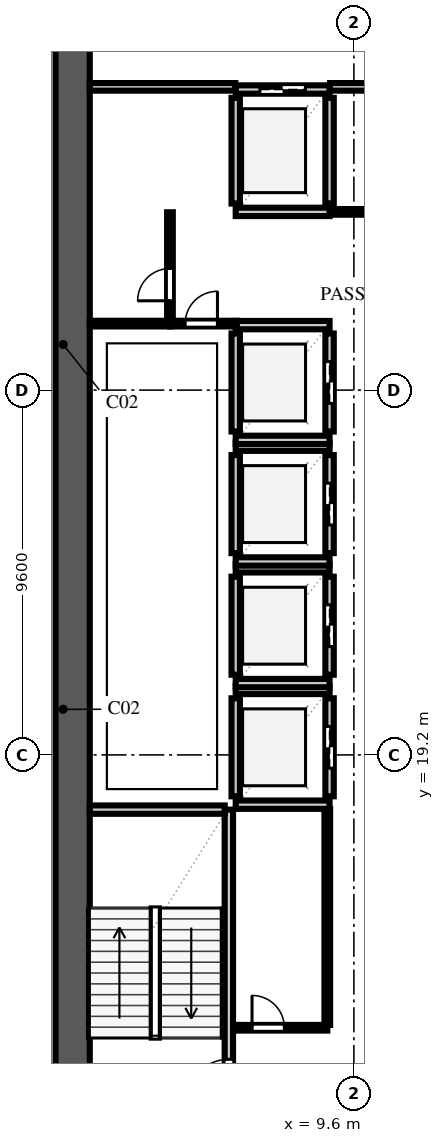
"""IFC4 building model, lengths in metres.
Left out: names, types, materials, properties, quantities, classifications, styles, units other than length and angle.
Written with IfcOpenShell. Run it as: python <this file> out.ifc"""

import sys

from ifc_helpers import new_model, si_unit, direction, frame, frame_2d, origin, place, context, subcontext, project, spatial, rectangle, extrude, element, fill, save


model = new_model("IFC4")
c1 = context("Model", 3, precision=1e-05, world=origin(), true_north=direction((0.0, 1.0)))
c2 = subcontext(c1, "Body", "Model", "MODEL_VIEW")
j1 = project(units=[si_unit("LENGTHUNIT", "METRE"), si_unit("PLANEANGLEUNIT", "RADIAN")], contexts=[c1])
p1 = place(None, origin())
s1 = spatial("IfcSite", under=j1, at=p1, CompositionType="ELEMENT")
p2 = place(p1, origin())
s2 = spatial("IfcBuilding", under=s1, at=p2, CompositionType="ELEMENT")
p3 = place(p2, frame((0.0, 0.0, 10.4)))
s3 = spatial("IfcBuildingStorey", under=s2, at=p3, CompositionType="ELEMENT", Elevation=10.4)
p4 = place(p3, frame((2.2, 9.15, 0.0), z_axis=(0.0, 0.0, 1.0), x_axis=(0.0, 1.0, 0.0)))
e1 = element("IfcWall", 1, at=p4, inside=s3, PredefinedType="SHEAR", context=c2, shape_type="SweptSolid", body=[
    extrude(rectangle(XDim=39.3, YDim=0.9, at=frame_2d((19.65, 0.0))), origin(), (0.0, 0.0, 1.0), 4.26),
])
p5 = place(p3, frame((6.31, 9.95, 0.0), z_axis=(0.0, 0.0, 1.0), x_axis=(0.0, 1.0, 0.0)))
e2 = element("IfcWall", 2, at=p5, inside=s3, PredefinedType="SOLIDWALL", context=c2, shape_type="SweptSolid", body=[
    extrude(rectangle(XDim=7.81, YDim=0.22, at=frame_2d((3.905, 0.0))), origin(), (0.0, 0.0, 1.0), 4.26),
])
p6 = place(p5, frame((0.14, 0.0, 0.0)))
e3 = element("IfcOpeningElement", 3, at=p6, cuts=e2, PredefinedType="OPENING", context=c2, shape_type="SweptSolid", body=[
    extrude(rectangle(XDim=1.1, YDim=2.2, at=frame_2d((0.55, 1.1))), frame((0.0, 0.122, 0.0), z_axis=(0.0, -1.0, 0.0), x_axis=(1.0, 0.0, 0.0)), (0.0, 0.0, 1.0), 0.244),
])
p7 = place(p3, frame((2.65, 17.76, 0.0), z_axis=(0.0, 0.0, 1.0), x_axis=(1.0, 0.0, 0.0)))
e4 = element("IfcWall", 4, at=p7, inside=s3, PredefinedType="SOLIDWALL", context=c2, shape_type="SweptSolid", body=[
    extrude(rectangle(XDim=3.55, YDim=0.22, at=frame_2d((1.775, 0.0))), origin(), (0.0, 0.0, 1.0), 4.26),
])
p8 = place(p3, frame((6.49, 18.11, 0.0), z_axis=(0.0, 0.0, 1.0), x_axis=(0.0, 1.0, 0.0)))
e5 = element("IfcWall", 5, at=p8, inside=s3, PredefinedType="SOLIDWALL", context=c2, shape_type="SweptSolid", body=[
    extrude(rectangle(XDim=2.58, YDim=0.22, at=frame_2d((1.29, 0.0))), origin(), (0.0, 0.0, 1.0), 4.26),
])
p9 = place(p3, frame((8.96, 18.11, 0.0), z_axis=(0.0, 0.0, 1.0), x_axis=(0.0, 1.0, 0.0)))
e6 = element("IfcWall", 6, at=p9, inside=s3, PredefinedType="SOLIDWALL", context=c2, shape_type="SweptSolid", body=[
    extrude(rectangle(XDim=2.58, YDim=0.22, at=frame_2d((1.29, 0.0))), origin(), (0.0, 0.0, 1.0), 4.26),
])
p10 = place(p9, frame((0.74, 0.0, 0.0)))
e7 = element("IfcOpeningElement", 7, at=p10, cuts=e6, PredefinedType="OPENING", context=c2, shape_type="SweptSolid", body=[
    extrude(rectangle(XDim=1.1, YDim=2.2, at=frame_2d((0.55, 1.1))), frame((0.0, 0.122, 0.0), z_axis=(0.0, -1.0, 0.0), x_axis=(1.0, 0.0, 0.0)), (0.0, 0.0, 1.0), 0.244),
])
for number, where, z_axis, x_axis in (
    (8, (6.49, 17.89, 0.0), (0.0, 0.0, 1.0), (1.0, 0.0, 0.0)),
    (9, (6.49, 20.91, 0.0), (0.0, 0.0, 1.0), (1.0, 0.0, 0.0)),
):
    element("IfcWall", number, at=place(p3, frame(where, z_axis=z_axis, x_axis=x_axis)), inside=s3, PredefinedType="SOLIDWALL", context=c2, shape_type="SweptSolid", body=[
        extrude(rectangle(XDim=2.47, YDim=0.22, at=frame_2d((1.235, 0.0))), origin(), (0.0, 0.0, 1.0), 4.26),
    ])
p11 = place(p3, frame((6.49, 21.31, 0.0), z_axis=(0.0, 0.0, 1.0), x_axis=(0.0, 1.0, 0.0)))
e10 = element("IfcWall", 10, at=p11, inside=s3, PredefinedType="SOLIDWALL", context=c2, shape_type="SweptSolid", body=[
    extrude(rectangle(XDim=2.58, YDim=0.22, at=frame_2d((1.29, 0.0))), origin(), (0.0, 0.0, 1.0), 4.26),
])
p12 = place(p3, frame((8.96, 21.31, 0.0), z_axis=(0.0, 0.0, 1.0), x_axis=(0.0, 1.0, 0.0)))
e11 = element("IfcWall", 11, at=p12, inside=s3, PredefinedType="SOLIDWALL", context=c2, shape_type="SweptSolid", body=[
    extrude(rectangle(XDim=2.58, YDim=0.22, at=frame_2d((1.29, 0.0))), origin(), (0.0, 0.0, 1.0), 4.26),
])
p13 = place(p12, frame((0.74, 0.0, 0.0)))
e12 = element("IfcOpeningElement", 12, at=p13, cuts=e11, PredefinedType="OPENING", context=c2, shape_type="SweptSolid", body=[
    extrude(rectangle(XDim=1.1, YDim=2.2, at=frame_2d((0.55, 1.1))), frame((0.0, 0.122, 0.0), z_axis=(0.0, -1.0, 0.0), x_axis=(1.0, 0.0, 0.0)), (0.0, 0.0, 1.0), 0.244),
])
for number, where, z_axis, x_axis in (
    (13, (6.49, 21.09, 0.0), (0.0, 0.0, 1.0), (1.0, 0.0, 0.0)),
    (14, (6.49, 24.11, 0.0), (0.0, 0.0, 1.0), (1.0, 0.0, 0.0)),
):
    element("IfcWall", number, at=place(p3, frame(where, z_axis=z_axis, x_axis=x_axis)), inside=s3, PredefinedType="SOLIDWALL", context=c2, shape_type="SweptSolid", body=[
        extrude(rectangle(XDim=2.47, YDim=0.22, at=frame_2d((1.235, 0.0))), origin(), (0.0, 0.0, 1.0), 4.26),
    ])
p14 = place(p3, frame((6.49, 24.51, 0.0), z_axis=(0.0, 0.0, 1.0), x_axis=(0.0, 1.0, 0.0)))
e15 = element("IfcWall", 15, at=p14, inside=s3, PredefinedType="SOLIDWALL", context=c2, shape_type="SweptSolid", body=[
    extrude(rectangle(XDim=2.58, YDim=0.22, at=frame_2d((1.29, 0.0))), origin(), (0.0, 0.0, 1.0), 4.26),
])
p15 = place(p3, frame((8.96, 24.51, 0.0), z_axis=(0.0, 0.0, 1.0), x_axis=(0.0, 1.0, 0.0)))
e16 = element("IfcWall", 16, at=p15, inside=s3, PredefinedType="SOLIDWALL", context=c2, shape_type="SweptSolid", body=[
    extrude(rectangle(XDim=2.58, YDim=0.22, at=frame_2d((1.29, 0.0))), origin(), (0.0, 0.0, 1.0), 4.26),
])
p16 = place(p15, frame((0.74, 0.0, 0.0)))
e17 = element("IfcOpeningElement", 17, at=p16, cuts=e16, PredefinedType="OPENING", context=c2, shape_type="SweptSolid", body=[
    extrude(rectangle(XDim=1.1, YDim=2.2, at=frame_2d((0.55, 1.1))), frame((0.0, 0.122, 0.0), z_axis=(0.0, -1.0, 0.0), x_axis=(1.0, 0.0, 0.0)), (0.0, 0.0, 1.0), 0.244),
])
for number, where, z_axis, x_axis in (
    (18, (6.49, 24.29, 0.0), (0.0, 0.0, 1.0), (1.0, 0.0, 0.0)),
    (19, (6.49, 27.31, 0.0), (0.0, 0.0, 1.0), (1.0, 0.0, 0.0)),
):
    element("IfcWall", number, at=place(p3, frame(where, z_axis=z_axis, x_axis=x_axis)), inside=s3, PredefinedType="SOLIDWALL", context=c2, shape_type="SweptSolid", body=[
        extrude(rectangle(XDim=2.47, YDim=0.22, at=frame_2d((1.235, 0.0))), origin(), (0.0, 0.0, 1.0), 4.26),
    ])
p17 = place(p3, frame((6.49, 27.71, 0.0), z_axis=(0.0, 0.0, 1.0), x_axis=(0.0, 1.0, 0.0)))
e20 = element("IfcWall", 20, at=p17, inside=s3, PredefinedType="SOLIDWALL", context=c2, shape_type="SweptSolid", body=[
    extrude(rectangle(XDim=2.58, YDim=0.22, at=frame_2d((1.29, 0.0))), origin(), (0.0, 0.0, 1.0), 4.26),
])
p18 = place(p3, frame((8.96, 27.71, 0.0), z_axis=(0.0, 0.0, 1.0), x_axis=(0.0, 1.0, 0.0)))
e21 = element("IfcWall", 21, at=p18, inside=s3, PredefinedType="SOLIDWALL", context=c2, shape_type="SweptSolid", body=[
    extrude(rectangle(XDim=2.58, YDim=0.22, at=frame_2d((1.29, 0.0))), origin(), (0.0, 0.0, 1.0), 4.26),
])
p19 = place(p18, frame((0.74, 0.0, 0.0)))
e22 = element("IfcOpeningElement", 22, at=p19, cuts=e21, PredefinedType="OPENING", context=c2, shape_type="SweptSolid", body=[
    extrude(rectangle(XDim=1.1, YDim=2.2, at=frame_2d((0.55, 1.1))), frame((0.0, 0.122, 0.0), z_axis=(0.0, -1.0, 0.0), x_axis=(1.0, 0.0, 0.0)), (0.0, 0.0, 1.0), 0.244),
])
for number, where, z_axis, x_axis in (
    (23, (6.49, 27.49, 0.0), (0.0, 0.0, 1.0), (1.0, 0.0, 0.0)),
    (24, (6.49, 30.51, 0.0), (0.0, 0.0, 1.0), (1.0, 0.0, 0.0)),
):
    element("IfcWall", number, at=place(p3, frame(where, z_axis=z_axis, x_axis=x_axis)), inside=s3, PredefinedType="SOLIDWALL", context=c2, shape_type="SweptSolid", body=[
        extrude(rectangle(XDim=2.47, YDim=0.22, at=frame_2d((1.235, 0.0))), origin(), (0.0, 0.0, 1.0), 4.26),
    ])
for number, where, z_axis, x_axis in (
    (25, (6.49, 33.71, 0.0), (0.0, 0.0, 1.0), (0.0, 1.0, 0.0)),
    (26, (8.96, 33.71, 0.0), (0.0, 0.0, 1.0), (0.0, 1.0, 0.0)),
):
    element("IfcWall", number, at=place(p3, frame(where, z_axis=z_axis, x_axis=x_axis)), inside=s3, PredefinedType="SOLIDWALL", context=c2, shape_type="SweptSolid", body=[
        extrude(rectangle(XDim=2.78, YDim=0.22, at=frame_2d((1.39, 0.0))), origin(), (0.0, 0.0, 1.0), 4.26),
    ])
p20 = place(p3, frame((6.49, 33.49, 0.0), z_axis=(0.0, 0.0, 1.0), x_axis=(1.0, 0.0, 0.0)))
e27 = element("IfcWall", 27, at=p20, inside=s3, PredefinedType="SOLIDWALL", context=c2, shape_type="SweptSolid", body=[
    extrude(rectangle(XDim=2.47, YDim=0.22, at=frame_2d((1.235, 0.0))), origin(), (0.0, 0.0, 1.0), 4.26),
])
p21 = place(p3, frame((6.49, 36.71, 0.0), z_axis=(0.0, 0.0, 1.0), x_axis=(1.0, 0.0, 0.0)))
e28 = element("IfcWall", 28, at=p21, inside=s3, PredefinedType="SOLIDWALL", context=c2, shape_type="SweptSolid", body=[
    extrude(rectangle(XDim=2.47, YDim=0.22, at=frame_2d((1.235, 0.0))), origin(), (0.0, 0.0, 1.0), 4.26),
])
p22 = place(p21, frame((0.635, 0.0, 0.0)))
e29 = element("IfcOpeningElement", 29, at=p22, cuts=e28, PredefinedType="OPENING", context=c2, shape_type="SweptSolid", body=[
    extrude(rectangle(XDim=1.2, YDim=2.2, at=frame_2d((0.6, 1.1))), frame((0.0, 0.122, 0.0), z_axis=(0.0, -1.0, 0.0), x_axis=(1.0, 0.0, 0.0)), (0.0, 0.0, 1.0), 0.244),
])
p23 = place(p3, frame((2.65, 36.78, 0.0), z_axis=(0.0, 0.0, 1.0), x_axis=(1.0, 0.0, 0.0)))
e30 = element("IfcWall", 30, at=p23, inside=s3, PredefinedType="SOLIDWALL", context=c2, shape_type="SweptSolid", body=[
    extrude(rectangle(XDim=3.83, YDim=0.2, at=frame_2d((1.915, 0.0))), origin(), (0.0, 0.0, 1.0), 4.26),
])
p24 = place(p3, frame((8.97, 36.78, 0.0), z_axis=(0.0, 0.0, 1.0), x_axis=(1.0, 0.0, 0.0)))
e31 = element("IfcWall", 31, at=p24, inside=s3, PredefinedType="SOLIDWALL", context=c2, shape_type="SweptSolid", body=[
    extrude(rectangle(XDim=1.51, YDim=0.2, at=frame_2d((0.755, 0.0))), origin(), (0.0, 0.0, 1.0), 4.26),
])
p25 = place(p3, frame((8.965, 33.49, 0.0), z_axis=(0.0, 0.0, 1.0), x_axis=(1.0, 0.0, 0.0)))
e32 = element("IfcWall", 32, at=p25, inside=s3, PredefinedType="PARTITIONING", context=c2, shape_type="SweptSolid", body=[
    extrude(rectangle(XDim=1.52, YDim=0.15, at=frame_2d((0.76, 0.0))), origin(), (0.0, 0.0, 1.0), 4.26),
])
p26 = place(p3, frame((6.42, 12.02, 0.0), z_axis=(0.0, 0.0, 1.0), x_axis=(1.0, 0.0, 0.0)))
e33 = element("IfcWall", 33, at=p26, inside=s3, PredefinedType="PARTITIONING", context=c2, shape_type="SweptSolid", body=[
    extrude(rectangle(XDim=2.48, YDim=0.15, at=frame_2d((1.24, 0.0))), origin(), (0.0, 0.0, 1.0), 4.26),
])
p27 = place(p26, frame((0.5, 0.0, 0.0)))
e34 = element("IfcOpeningElement", 34, at=p27, cuts=e33, PredefinedType="OPENING", context=c2, shape_type="SweptSolid", body=[
    extrude(rectangle(XDim=0.85, YDim=2.1, at=frame_2d((0.425, 1.05))), frame((0.0, 0.087, 0.0), z_axis=(0.0, -1.0, 0.0), x_axis=(1.0, 0.0, 0.0)), (0.0, 0.0, 1.0), 0.174),
])
p28 = place(p3, frame((8.9, 12.095, 0.0), z_axis=(0.0, 0.0, 1.0), x_axis=(0.0, 1.0, 0.0)))
e35 = element("IfcWall", 35, at=p28, inside=s3, PredefinedType="PARTITIONING", context=c2, shape_type="SweptSolid", body=[
    extrude(rectangle(XDim=5.68, YDim=0.15, at=frame_2d((2.84, 0.0))), origin(), (0.0, 0.0, 1.0), 4.26),
])
p29 = place(p3, frame((4.76, 30.55, 0.0), z_axis=(0.0, 0.0, 1.0), x_axis=(0.0, 1.0, 0.0)))
e36 = element("IfcWall", 36, at=p29, inside=s3, PredefinedType="PARTITIONING", context=c2, shape_type="SweptSolid", body=[
    extrude(rectangle(XDim=2.93, YDim=0.15, at=frame_2d((1.465, 0.0))), origin(), (0.0, 0.0, 1.0), 4.26),
])
p30 = place(p29, frame((0.6, 0.0, 0.0)))
e37 = element("IfcOpeningElement", 37, at=p30, cuts=e36, PredefinedType="OPENING", context=c2, shape_type="SweptSolid", body=[
    extrude(rectangle(XDim=0.85, YDim=2.1, at=frame_2d((0.425, 1.05))), frame((0.0, 0.087, 0.0), z_axis=(0.0, -1.0, 0.0), x_axis=(1.0, 0.0, 0.0)), (0.0, 0.0, 1.0), 0.174),
])
p31 = place(p3, frame((4.76, 30.55, 0.0), z_axis=(0.0, 0.0, 1.0), x_axis=(1.0, 0.0, 0.0)))
e38 = element("IfcWall", 38, at=p31, inside=s3, PredefinedType="PARTITIONING", context=c2, shape_type="SweptSolid", body=[
    extrude(rectangle(XDim=1.76, YDim=0.15, at=frame_2d((0.88, 0.0))), origin(), (0.0, 0.0, 1.0), 4.26),
])
p32 = place(p31, frame((0.4, 0.0, 0.0)))
e39 = element("IfcOpeningElement", 39, at=p32, cuts=e38, PredefinedType="OPENING", context=c2, shape_type="SweptSolid", body=[
    extrude(rectangle(XDim=0.85, YDim=2.1, at=frame_2d((0.425, 1.05))), frame((0.0, 0.087, 0.0), z_axis=(0.0, -1.0, 0.0), x_axis=(1.0, 0.0, 0.0)), (0.0, 0.0, 1.0), 0.174),
])
p33 = place(p3, frame((2.65, 30.55, 0.0), z_axis=(0.0, 0.0, 1.0), x_axis=(1.0, 0.0, 0.0)))
e40 = element("IfcWall", 40, at=p33, inside=s3, PredefinedType="PARTITIONING", context=c2, shape_type="SweptSolid", body=[
    extrude(rectangle(XDim=2.11, YDim=0.15, at=frame_2d((1.055, 0.0))), origin(), (0.0, 0.0, 1.0), 4.26),
])
p34 = place(p6, origin())
e41 = element("IfcDoor", 41, at=p34, inside=s3, OperationType="SINGLE_SWING_LEFT", PredefinedType="DOOR", context=c2, shape_type="SweptSolid", body=[
    extrude(rectangle(XDim=1.1, YDim=2.2, at=frame_2d((0.55, 1.1))), frame((0.0, 0.025, 0.0), z_axis=(0.0, -1.0, 0.0), x_axis=(1.0, 0.0, 0.0)), (0.0, 0.0, 1.0), 0.05),
])
fill(e3, e41)
p35 = place(p10, origin())
e42 = element("IfcDoor", 42, at=p35, inside=s3, OperationType="DOUBLE_DOOR_SLIDING", PredefinedType="DOOR", context=c2, shape_type="SweptSolid", body=[
    extrude(rectangle(XDim=1.1, YDim=2.2, at=frame_2d((0.55, 1.1))), frame((0.0, 0.025, 0.0), z_axis=(0.0, -1.0, 0.0), x_axis=(1.0, 0.0, 0.0)), (0.0, 0.0, 1.0), 0.05),
])
fill(e7, e42)
p36 = place(p13, origin())
e43 = element("IfcDoor", 43, at=p36, inside=s3, OperationType="DOUBLE_DOOR_SLIDING", PredefinedType="DOOR", context=c2, shape_type="SweptSolid", body=[
    extrude(rectangle(XDim=1.1, YDim=2.2, at=frame_2d((0.55, 1.1))), frame((0.0, 0.025, 0.0), z_axis=(0.0, -1.0, 0.0), x_axis=(1.0, 0.0, 0.0)), (0.0, 0.0, 1.0), 0.05),
])
fill(e12, e43)
p37 = place(p16, origin())
e44 = element("IfcDoor", 44, at=p37, inside=s3, OperationType="DOUBLE_DOOR_SLIDING", PredefinedType="DOOR", context=c2, shape_type="SweptSolid", body=[
    extrude(rectangle(XDim=1.1, YDim=2.2, at=frame_2d((0.55, 1.1))), frame((0.0, 0.025, 0.0), z_axis=(0.0, -1.0, 0.0), x_axis=(1.0, 0.0, 0.0)), (0.0, 0.0, 1.0), 0.05),
])
fill(e17, e44)
p38 = place(p19, origin())
e45 = element("IfcDoor", 45, at=p38, inside=s3, OperationType="DOUBLE_DOOR_SLIDING", PredefinedType="DOOR", context=c2, shape_type="SweptSolid", body=[
    extrude(rectangle(XDim=1.1, YDim=2.2, at=frame_2d((0.55, 1.1))), frame((0.0, 0.025, 0.0), z_axis=(0.0, -1.0, 0.0), x_axis=(1.0, 0.0, 0.0)), (0.0, 0.0, 1.0), 0.05),
])
fill(e22, e45)
p39 = place(p22, origin())
e46 = element("IfcDoor", 46, at=p39, inside=s3, OperationType="DOUBLE_DOOR_SLIDING", PredefinedType="DOOR", context=c2, shape_type="SweptSolid", body=[
    extrude(rectangle(XDim=1.2, YDim=2.2, at=frame_2d((0.6, 1.1))), frame((0.0, 0.025, 0.0), z_axis=(0.0, -1.0, 0.0), x_axis=(1.0, 0.0, 0.0)), (0.0, 0.0, 1.0), 0.05),
])
fill(e29, e46)
p40 = place(p27, origin())
e47 = element("IfcDoor", 47, at=p40, inside=s3, OperationType="SINGLE_SWING_LEFT", PredefinedType="DOOR", context=c2, shape_type="SweptSolid", body=[
    extrude(rectangle(XDim=0.85, YDim=2.1, at=frame_2d((0.425, 1.05))), frame((0.0, 0.025, 0.0), z_axis=(0.0, -1.0, 0.0), x_axis=(1.0, 0.0, 0.0)), (0.0, 0.0, 1.0), 0.05),
])
fill(e34, e47)
p41 = place(p30, origin())
e48 = element("IfcDoor", 48, at=p41, inside=s3, OperationType="SINGLE_SWING_LEFT", PredefinedType="DOOR", context=c2, shape_type="SweptSolid", body=[
    extrude(rectangle(XDim=0.85, YDim=2.1, at=frame_2d((0.425, 1.05))), frame((0.0, 0.025, 0.0), z_axis=(0.0, -1.0, 0.0), x_axis=(1.0, 0.0, 0.0)), (0.0, 0.0, 1.0), 0.05),
])
fill(e37, e48)
p42 = place(p32, origin())
e49 = element("IfcDoor", 49, at=p42, inside=s3, OperationType="SINGLE_SWING_RIGHT", PredefinedType="DOOR", context=c2, shape_type="SweptSolid", body=[
    extrude(rectangle(XDim=0.85, YDim=2.1, at=frame_2d((0.425, 1.05))), frame((0.0, 0.025, 0.0), z_axis=(0.0, -1.0, 0.0), x_axis=(1.0, 0.0, 0.0)), (0.0, 0.0, 1.0), 0.05),
])
fill(e39, e49)
save(model, sys.argv[1])
